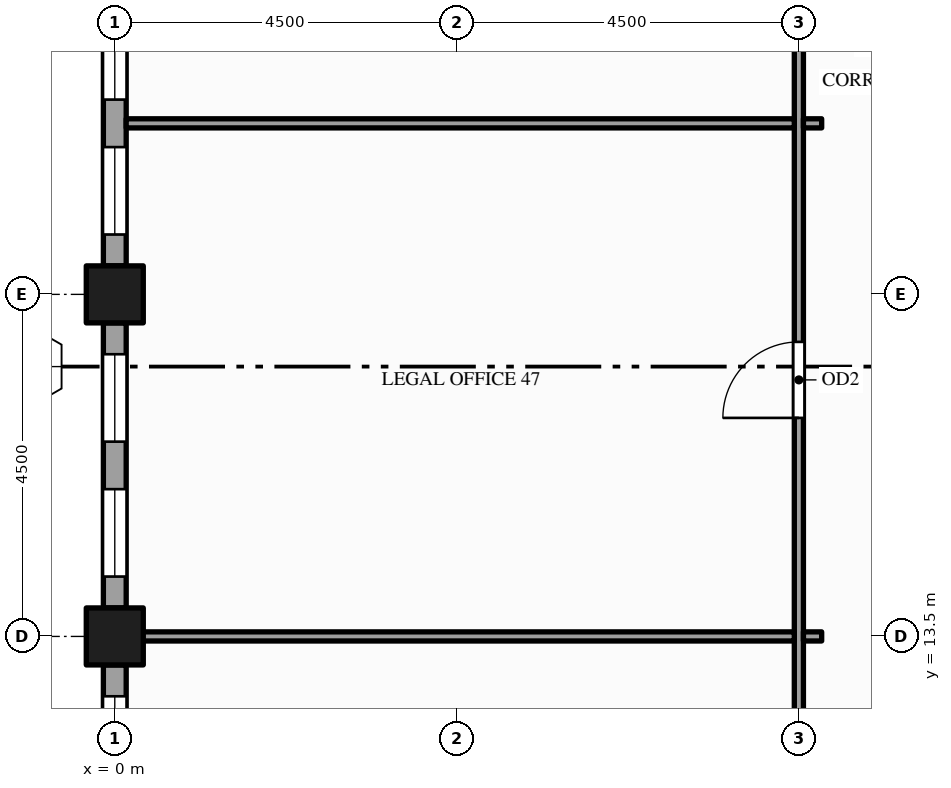
"""IFC4 building model, lengths in metres.
Left out: names, types, materials, properties, quantities, classifications, styles, units other than length and angle.
Written with IfcOpenShell. Run it as: python <this file> out.ifc"""

import sys

from ifc_helpers import new_model, si_unit, direction, frame, frame_2d, origin, origin_2d, place, context, subcontext, project, spatial, rectangle, hollow_rectangle, extrude, element, fill, save


model = new_model("IFC4")
c1 = context("Model", 3, precision=1e-05, world=origin(), true_north=direction((0.0, 1.0)))
c2 = subcontext(c1, "Body", "Model", "MODEL_VIEW")
j1 = project(units=[si_unit("LENGTHUNIT", "METRE"), si_unit("PLANEANGLEUNIT", "RADIAN")], contexts=[c1])
p1 = place(None, origin())
s1 = spatial("IfcSite", under=j1, at=p1, CompositionType="ELEMENT")
p2 = place(p1, origin())
s2 = spatial("IfcBuilding", under=s1, at=p2, CompositionType="ELEMENT")
p3 = place(p2, frame((0.0, 0.0, 215.0)))
s3 = spatial("IfcBuildingStorey", under=s2, at=p3, CompositionType="ELEMENT", Elevation=215.0)
for number, where, z_axis, x_axis in (
    (1, (0.0, 13.5, -0.15), (0.0, 0.0, 1.0), (1.0, 0.0, 0.0)),
    (2, (0.0, 18.0, -0.15), (0.0, 0.0, 1.0), (1.0, 0.0, 0.0)),
):
    element("IfcColumn", number, at=place(p3, frame(where, z_axis=z_axis, x_axis=x_axis)), inside=s3, PredefinedType="COLUMN", context=c2, shape_type="SweptSolid", body=[
        extrude(hollow_rectangle(XDim=0.75, YDim=0.75, WallThickness=0.036, at=origin_2d()), origin(), (0.0, 0.0, 1.0), 4.0),
    ])
p4 = place(p3, frame((0.0, 22.125, 0.0), z_axis=(0.0, 0.0, 1.0), x_axis=(0.0, -1.0, 0.0)))
e3 = element("IfcWall", 3, at=p4, inside=s3, PredefinedType="STANDARD", context=c2, shape_type="SweptSolid", body=[
    extrude(rectangle(XDim=3.75, YDim=0.3, at=frame_2d((1.875, 0.0))), origin(), (0.0, 0.0, 1.0), 3.157),
])
p5 = place(p4, frame((0.413, 0.0, 0.9)))
e4 = element("IfcOpeningElement", 4, at=p5, cuts=e3, PredefinedType="OPENING", context=c2, shape_type="SweptSolid", body=[
    extrude(rectangle(XDim=1.15, YDim=2.0, at=frame_2d((0.575, 1.0))), frame((0.0, 0.16, 0.0), z_axis=(0.0, -1.0, 0.0), x_axis=(1.0, 0.0, 0.0)), (0.0, 0.0, 1.0), 0.32),
])
p6 = place(p4, frame((2.188, 0.0, 0.9)))
e5 = element("IfcOpeningElement", 5, at=p6, cuts=e3, PredefinedType="OPENING", context=c2, shape_type="SweptSolid", body=[
    extrude(rectangle(XDim=1.15, YDim=2.0, at=frame_2d((0.575, 1.0))), frame((0.0, 0.16, 0.0), z_axis=(0.0, -1.0, 0.0), x_axis=(1.0, 0.0, 0.0)), (0.0, 0.0, 1.0), 0.32),
])
p7 = place(p3, frame((0.0, 17.625, 0.0), z_axis=(0.0, 0.0, 1.0), x_axis=(0.0, -1.0, 0.0)))
e6 = element("IfcWall", 6, at=p7, inside=s3, PredefinedType="STANDARD", context=c2, shape_type="SweptSolid", body=[
    extrude(rectangle(XDim=3.75, YDim=0.3, at=frame_2d((1.875, 0.0))), origin(), (0.0, 0.0, 1.0), 3.157),
])
p8 = place(p7, frame((0.413, 0.0, 0.9)))
e7 = element("IfcOpeningElement", 7, at=p8, cuts=e6, PredefinedType="OPENING", context=c2, shape_type="SweptSolid", body=[
    extrude(rectangle(XDim=1.15, YDim=2.0, at=frame_2d((0.575, 1.0))), frame((0.0, 0.16, 0.0), z_axis=(0.0, -1.0, 0.0), x_axis=(1.0, 0.0, 0.0)), (0.0, 0.0, 1.0), 0.32),
])
p9 = place(p7, frame((2.188, 0.0, 0.9)))
e8 = element("IfcOpeningElement", 8, at=p9, cuts=e6, PredefinedType="OPENING", context=c2, shape_type="SweptSolid", body=[
    extrude(rectangle(XDim=1.15, YDim=2.0, at=frame_2d((0.575, 1.0))), frame((0.0, 0.16, 0.0), z_axis=(0.0, -1.0, 0.0), x_axis=(1.0, 0.0, 0.0)), (0.0, 0.0, 1.0), 0.32),
])
p10 = place(p3, frame((0.0, 13.125, 0.0), z_axis=(0.0, 0.0, 1.0), x_axis=(0.0, -1.0, 0.0)))
e9 = element("IfcWall", 9, at=p10, inside=s3, PredefinedType="STANDARD", context=c2, shape_type="SweptSolid", body=[
    extrude(rectangle(XDim=3.75, YDim=0.3, at=frame_2d((1.875, 0.0))), origin(), (0.0, 0.0, 1.0), 3.157),
])
p11 = place(p10, frame((0.413, 0.0, 0.9)))
e10 = element("IfcOpeningElement", 10, at=p11, cuts=e9, PredefinedType="OPENING", context=c2, shape_type="SweptSolid", body=[
    extrude(rectangle(XDim=1.15, YDim=2.0, at=frame_2d((0.575, 1.0))), frame((0.0, 0.16, 0.0), z_axis=(0.0, -1.0, 0.0), x_axis=(1.0, 0.0, 0.0)), (0.0, 0.0, 1.0), 0.32),
])
p12 = place(p10, frame((2.188, 0.0, 0.9)))
e11 = element("IfcOpeningElement", 11, at=p12, cuts=e9, PredefinedType="OPENING", context=c2, shape_type="SweptSolid", body=[
    extrude(rectangle(XDim=1.15, YDim=2.0, at=frame_2d((0.575, 1.0))), frame((0.0, 0.16, 0.0), z_axis=(0.0, -1.0, 0.0), x_axis=(1.0, 0.0, 0.0)), (0.0, 0.0, 1.0), 0.32),
])
p13 = place(p3, frame((9.0, 8.7, 0.0), z_axis=(0.0, 0.0, 1.0), x_axis=(0.0, 1.0, 0.0)))
e12 = element("IfcWall", 12, at=p13, inside=s3, PredefinedType="PARTITIONING", context=c2, shape_type="SweptSolid", body=[
    extrude(rectangle(XDim=23.1, YDim=0.12, at=frame_2d((11.55, 0.0))), origin(), (0.0, 0.0, 1.0), 2.6),
])
p14 = place(p13, frame((2.05, 0.0, 0.0)))
e13 = element("IfcOpeningElement", 13, at=p14, cuts=e12, PredefinedType="OPENING", context=c2, shape_type="SweptSolid", body=[
    extrude(rectangle(XDim=1.0, YDim=2.1, at=frame_2d((0.5, 1.05))), frame((0.0, 0.07, 0.0), z_axis=(0.0, -1.0, 0.0), x_axis=(1.0, 0.0, 0.0)), (0.0, 0.0, 1.0), 0.14),
])
p15 = place(p13, frame((7.675, 0.0, 0.0)))
e14 = element("IfcOpeningElement", 14, at=p15, cuts=e12, PredefinedType="OPENING", context=c2, shape_type="SweptSolid", body=[
    extrude(rectangle(XDim=1.0, YDim=2.1, at=frame_2d((0.5, 1.05))), frame((0.0, 0.07, 0.0), z_axis=(0.0, -1.0, 0.0), x_axis=(1.0, 0.0, 0.0)), (0.0, 0.0, 1.0), 0.14),
])
p16 = place(p13, frame((14.455, 0.0, 0.0)))
e15 = element("IfcOpeningElement", 15, at=p16, cuts=e12, PredefinedType="OPENING", context=c2, shape_type="SweptSolid", body=[
    extrude(rectangle(XDim=1.0, YDim=2.1, at=frame_2d((0.5, 1.05))), frame((0.0, 0.07, 0.0), z_axis=(0.0, -1.0, 0.0), x_axis=(1.0, 0.0, 0.0)), (0.0, 0.0, 1.0), 0.14),
])
p17 = place(p3, frame((0.15, 13.5, 0.0), z_axis=(0.0, 0.0, 1.0), x_axis=(1.0, 0.0, 0.0)))
e16 = element("IfcWall", 16, at=p17, inside=s3, PredefinedType="PARTITIONING", context=c2, shape_type="SweptSolid", body=[
    extrude(rectangle(XDim=8.79, YDim=0.12, at=frame_2d((4.395, 0.0))), origin(), (0.0, 0.0, 1.0), 2.87),
])
p18 = place(p3, frame((9.06, 13.5, 0.0), z_axis=(0.0, 0.0, 1.0), x_axis=(1.0, 0.0, 0.0)))
e17 = element("IfcWall", 17, at=p18, inside=s3, PredefinedType="PARTITIONING", context=c2, shape_type="SweptSolid", body=[
    extrude(rectangle(XDim=0.24, YDim=0.12, at=frame_2d((0.12, 0.0))), origin(), (0.0, 0.0, 1.0), 2.87),
])
p19 = place(p3, frame((0.15, 20.25, 0.0), z_axis=(0.0, 0.0, 1.0), x_axis=(1.0, 0.0, 0.0)))
e18 = element("IfcWall", 18, at=p19, inside=s3, PredefinedType="PARTITIONING", context=c2, shape_type="SweptSolid", body=[
    extrude(rectangle(XDim=8.79, YDim=0.12, at=frame_2d((4.395, 0.0))), origin(), (0.0, 0.0, 1.0), 2.87),
])
p20 = place(p3, frame((9.06, 20.25, 0.0), z_axis=(0.0, 0.0, 1.0), x_axis=(1.0, 0.0, 0.0)))
e19 = element("IfcWall", 19, at=p20, inside=s3, PredefinedType="PARTITIONING", context=c2, shape_type="SweptSolid", body=[
    extrude(rectangle(XDim=0.24, YDim=0.12, at=frame_2d((0.12, 0.0))), origin(), (0.0, 0.0, 1.0), 2.87),
])
p21 = place(p5, origin())
e20 = element("IfcWindow", 20, at=p21, inside=s3, PartitioningType="SINGLE_PANEL", PredefinedType="WINDOW", context=c2, shape_type="SweptSolid", body=[
    extrude(rectangle(XDim=1.15, YDim=2.0, at=frame_2d((0.575, 1.0))), frame((0.0, 0.03, 0.0), z_axis=(0.0, -1.0, 0.0), x_axis=(1.0, 0.0, 0.0)), (0.0, 0.0, 1.0), 0.06),
])
fill(e4, e20)
p22 = place(p6, origin())
e21 = element("IfcWindow", 21, at=p22, inside=s3, PartitioningType="SINGLE_PANEL", PredefinedType="WINDOW", context=c2, shape_type="SweptSolid", body=[
    extrude(rectangle(XDim=1.15, YDim=2.0, at=frame_2d((0.575, 1.0))), frame((0.0, 0.03, 0.0), z_axis=(0.0, -1.0, 0.0), x_axis=(1.0, 0.0, 0.0)), (0.0, 0.0, 1.0), 0.06),
])
fill(e5, e21)
p23 = place(p8, origin())
e22 = element("IfcWindow", 22, at=p23, inside=s3, PartitioningType="SINGLE_PANEL", PredefinedType="WINDOW", context=c2, shape_type="SweptSolid", body=[
    extrude(rectangle(XDim=1.15, YDim=2.0, at=frame_2d((0.575, 1.0))), frame((0.0, 0.03, 0.0), z_axis=(0.0, -1.0, 0.0), x_axis=(1.0, 0.0, 0.0)), (0.0, 0.0, 1.0), 0.06),
])
fill(e7, e22)
p24 = place(p9, origin())
e23 = element("IfcWindow", 23, at=p24, inside=s3, PartitioningType="SINGLE_PANEL", PredefinedType="WINDOW", context=c2, shape_type="SweptSolid", body=[
    extrude(rectangle(XDim=1.15, YDim=2.0, at=frame_2d((0.575, 1.0))), frame((0.0, 0.03, 0.0), z_axis=(0.0, -1.0, 0.0), x_axis=(1.0, 0.0, 0.0)), (0.0, 0.0, 1.0), 0.06),
])
fill(e8, e23)
p25 = place(p11, origin())
e24 = element("IfcWindow", 24, at=p25, inside=s3, PartitioningType="SINGLE_PANEL", PredefinedType="WINDOW", context=c2, shape_type="SweptSolid", body=[
    extrude(rectangle(XDim=1.15, YDim=2.0, at=frame_2d((0.575, 1.0))), frame((0.0, 0.03, 0.0), z_axis=(0.0, -1.0, 0.0), x_axis=(1.0, 0.0, 0.0)), (0.0, 0.0, 1.0), 0.06),
])
fill(e10, e24)
p26 = place(p15, origin())
e25 = element("IfcDoor", 25, at=p26, inside=s3, OperationType="SINGLE_SWING_LEFT", PredefinedType="DOOR", context=c2, shape_type="SweptSolid", body=[
    extrude(rectangle(XDim=1.0, YDim=2.1, at=frame_2d((0.5, 1.05))), frame((0.0, 0.025, 0.0), z_axis=(0.0, -1.0, 0.0), x_axis=(1.0, 0.0, 0.0)), (0.0, 0.0, 1.0), 0.05),
])
fill(e14, e25)
save(model, sys.argv[1])
